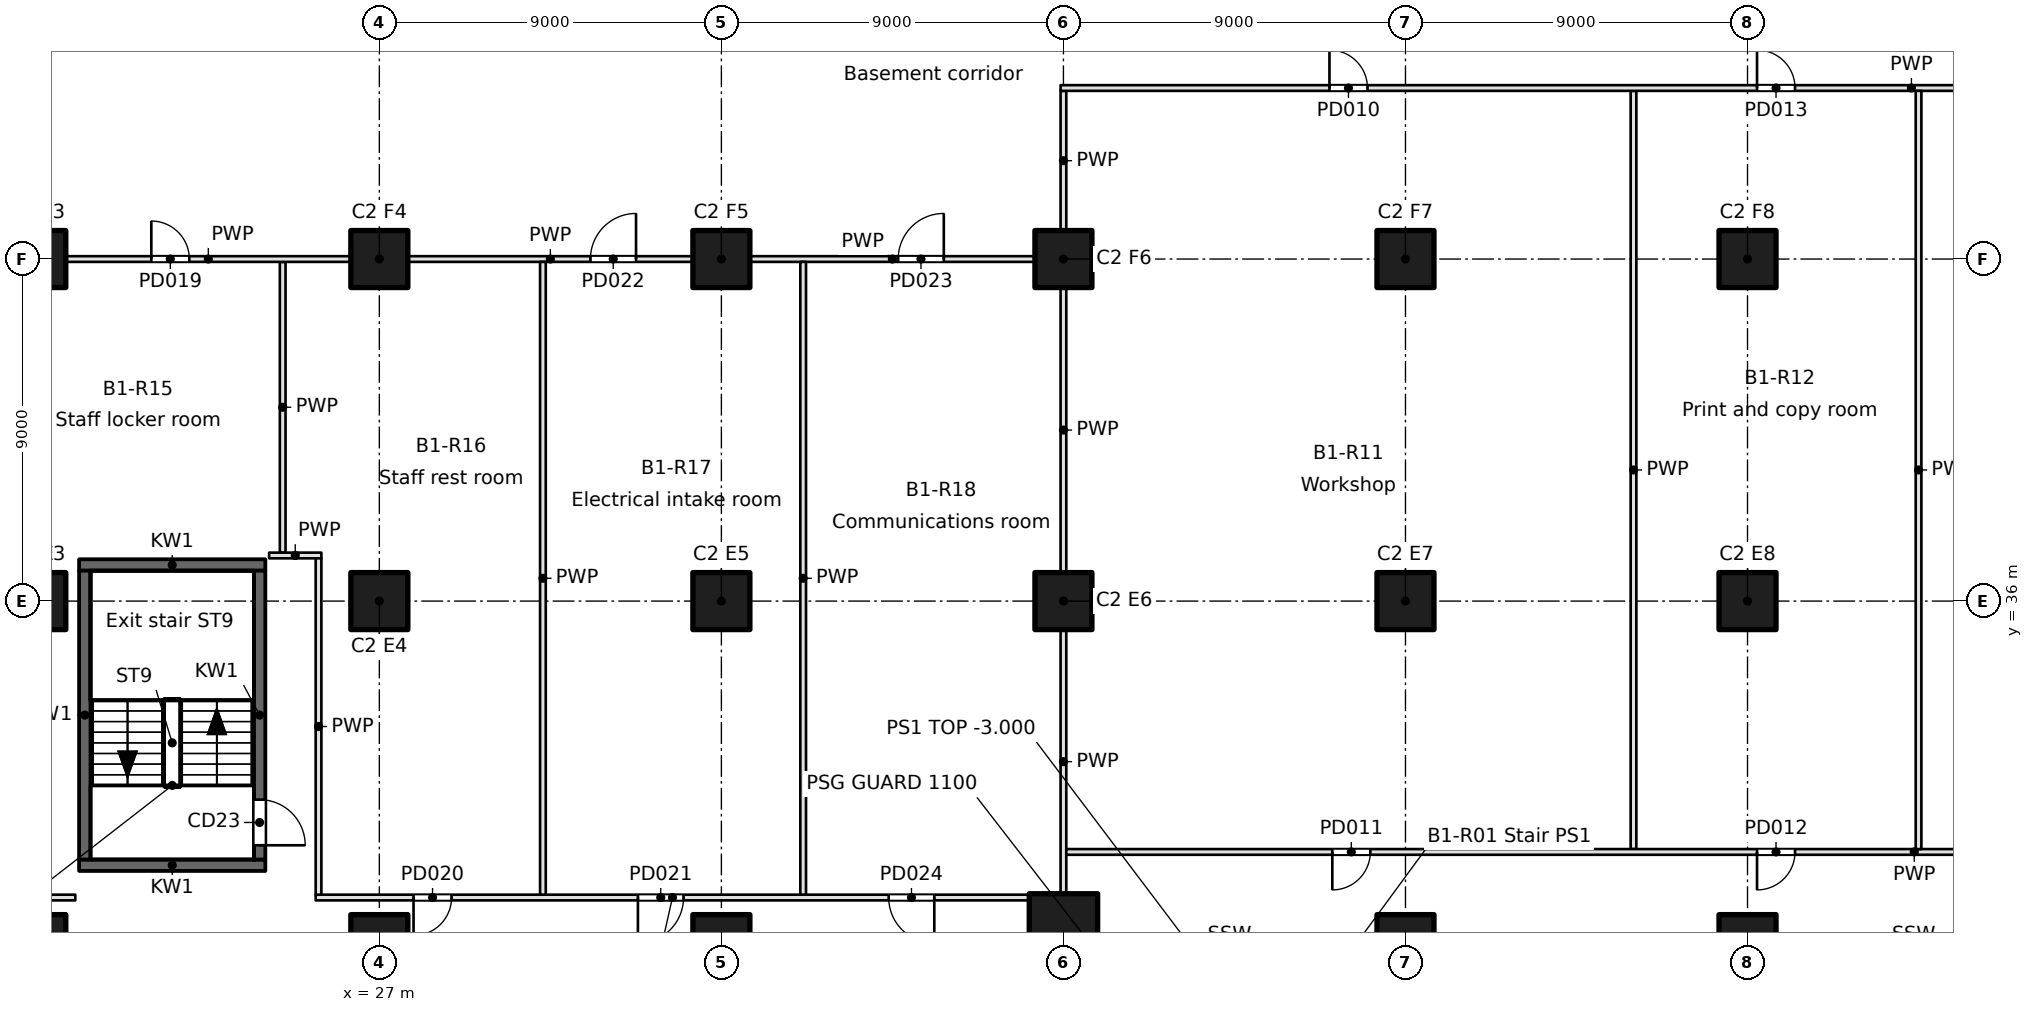
"""IFC4 building model, lengths in metres.
Left out: names, types, materials, properties, quantities, classifications, styles, units other than length and angle.
Written with IfcOpenShell. Run it as: python <this file> out.ifc"""

import sys

from ifc_helpers import new_model, si_unit, direction, frame, frame_2d, origin, origin_2d, place, context, subcontext, project, spatial, rectangle, extrude, element, fill, save


model = new_model("IFC4")
c1 = context("Model", 3, precision=1e-05, world=origin(), true_north=direction((0.0, 1.0)))
c2 = subcontext(c1, "Body", "Model", "MODEL_VIEW")
j1 = project(units=[si_unit("LENGTHUNIT", "METRE"), si_unit("PLANEANGLEUNIT", "RADIAN")], contexts=[c1])
p1 = place(None, origin())
s1 = spatial("IfcSite", under=j1, at=p1, CompositionType="ELEMENT")
p2 = place(p1, origin())
s2 = spatial("IfcBuilding", under=s1, at=p2, CompositionType="ELEMENT")
p3 = place(p2, frame((0.0, 0.0, -6.0)))
s3 = spatial("IfcBuildingStorey", under=s2, at=p3, CompositionType="ELEMENT", Elevation=-6.0)
p4 = place(p3, frame((45.0, 27.0, -0.6), z_axis=(0.0, 0.0, 1.0), x_axis=(0.0, 1.0, 0.0)))
e1 = element("IfcColumn", 1, at=p4, inside=s3, PredefinedType="COLUMN", context=c2, shape_type="SweptSolid", body=[
    extrude(rectangle(XDim=2.6, YDim=1.8, at=origin_2d()), origin(), (0.0, 0.0, 1.0), 6.6),
])
for number, where, z_axis, x_axis in (
    (2, (45.0, 36.0, -0.6), (0.0, 0.0, 1.0), (1.0, 0.0, 0.0)),
    (3, (45.0, 45.0, -0.6), (0.0, 0.0, 1.0), (1.0, 0.0, 0.0)),
    (4, (18.0, 27.0, -0.6), (0.0, 0.0, 1.0), (1.0, 0.0, 0.0)),
    (5, (18.0, 36.0, -0.6), (0.0, 0.0, 1.0), (1.0, 0.0, 0.0)),
    (6, (18.0, 45.0, -0.6), (0.0, 0.0, 1.0), (1.0, 0.0, 0.0)),
    (7, (27.0, 27.0, -0.6), (0.0, 0.0, 1.0), (1.0, 0.0, 0.0)),
    (8, (27.0, 36.0, -0.6), (0.0, 0.0, 1.0), (1.0, 0.0, 0.0)),
    (9, (27.0, 45.0, -0.6), (0.0, 0.0, 1.0), (1.0, 0.0, 0.0)),
    (10, (36.0, 27.0, -0.6), (0.0, 0.0, 1.0), (1.0, 0.0, 0.0)),
    (11, (36.0, 36.0, -0.6), (0.0, 0.0, 1.0), (1.0, 0.0, 0.0)),
    (12, (36.0, 45.0, -0.6), (0.0, 0.0, 1.0), (1.0, 0.0, 0.0)),
    (13, (54.0, 27.0, -0.6), (0.0, 0.0, 1.0), (1.0, 0.0, 0.0)),
    (14, (54.0, 36.0, -0.6), (0.0, 0.0, 1.0), (1.0, 0.0, 0.0)),
    (15, (54.0, 45.0, -0.6), (0.0, 0.0, 1.0), (1.0, 0.0, 0.0)),
    (16, (63.0, 27.0, -0.6), (0.0, 0.0, 1.0), (1.0, 0.0, 0.0)),
    (17, (63.0, 36.0, -0.6), (0.0, 0.0, 1.0), (1.0, 0.0, 0.0)),
    (18, (63.0, 45.0, -0.6), (0.0, 0.0, 1.0), (1.0, 0.0, 0.0)),
):
    element("IfcColumn", number, at=place(p3, frame(where, z_axis=z_axis, x_axis=x_axis)), inside=s3, PredefinedType="COLUMN", context=c2, shape_type="SweptSolid", body=[
        extrude(rectangle(XDim=1.5, YDim=1.5, at=origin_2d()), origin(), (0.0, 0.0, 1.0), 6.6),
    ])
for number, where, z_axis, x_axis in (
    (19, (19.1, 29.05, 0.0), (0.0, 0.0, 1.0), (1.0, 0.0, 0.0)),
    (20, (19.1, 36.95, 0.0), (0.0, 0.0, 1.0), (1.0, 0.0, 0.0)),
):
    element("IfcWall", number, at=place(p3, frame(where, z_axis=z_axis, x_axis=x_axis)), inside=s3, PredefinedType="SOLIDWALL", context=c2, shape_type="SweptSolid", body=[
        extrude(rectangle(XDim=4.9, YDim=0.3, at=frame_2d((2.45, 0.0))), origin(), (0.0, 0.0, 1.0), 5.6),
    ])
p5 = place(p3, frame((19.25, 29.2, 0.0), z_axis=(0.0, 0.0, 1.0), x_axis=(0.0, 1.0, 0.0)))
e21 = element("IfcWall", 21, at=p5, inside=s3, PredefinedType="SOLIDWALL", context=c2, shape_type="SweptSolid", body=[
    extrude(rectangle(XDim=7.6, YDim=0.3, at=frame_2d((3.8, 0.0))), origin(), (0.0, 0.0, 1.0), 5.6),
])
p6 = place(p3, frame((23.85, 29.2, 0.0), z_axis=(0.0, 0.0, 1.0), x_axis=(0.0, 1.0, 0.0)))
e22 = element("IfcWall", 22, at=p6, inside=s3, PredefinedType="SOLIDWALL", context=c2, shape_type="SweptSolid", body=[
    extrude(rectangle(XDim=7.6, YDim=0.3, at=frame_2d((3.8, 0.0))), origin(), (0.0, 0.0, 1.0), 5.6),
])
p7 = place(p6, frame((0.375, 0.0, 0.0)))
e23 = element("IfcOpeningElement", 23, at=p7, cuts=e22, PredefinedType="OPENING", context=c2, shape_type="SweptSolid", body=[
    extrude(rectangle(XDim=1.2, YDim=2.1, at=frame_2d((0.6, 1.05))), frame((0.0, 0.15, 0.0), z_axis=(0.0, -1.0, 0.0), x_axis=(1.0, 0.0, 0.0)), (0.0, 0.0, 1.0), 0.3),
])
p8 = place(p3, frame((45.0, 28.3, 0.0), z_axis=(0.0, 0.0, 1.0), x_axis=(0.0, 1.0, 0.0)))
e24 = element("IfcWall", 24, at=p8, inside=s3, PredefinedType="PARTITIONING", context=c2, shape_type="SweptSolid", body=[
    extrude(rectangle(XDim=6.95, YDim=0.15, at=frame_2d((3.475, 0.0))), origin(), (0.0, 0.0, 1.0), 5.6),
])
p9 = place(p3, frame((45.0, 36.75, 0.0), z_axis=(0.0, 0.0, 1.0), x_axis=(0.0, 1.0, 0.0)))
e25 = element("IfcWall", 25, at=p9, inside=s3, PredefinedType="PARTITIONING", context=c2, shape_type="SweptSolid", body=[
    extrude(rectangle(XDim=7.5, YDim=0.15, at=frame_2d((3.75, 0.0))), origin(), (0.0, 0.0, 1.0), 5.6),
])
p10 = place(p3, frame((45.0, 45.75, 0.0), z_axis=(0.0, 0.0, 1.0), x_axis=(0.0, 1.0, 0.0)))
e26 = element("IfcWall", 26, at=p10, inside=s3, PredefinedType="PARTITIONING", context=c2, shape_type="SweptSolid", body=[
    extrude(rectangle(XDim=3.675, YDim=0.15, at=frame_2d((1.837, 0.0))), origin(), (0.0, 0.0, 1.0), 5.6),
])
p11 = place(p3, frame((60.0, 29.475, 0.0), z_axis=(0.0, 0.0, 1.0), x_axis=(0.0, 1.0, 0.0)))
e27 = element("IfcWall", 27, at=p11, inside=s3, PredefinedType="PARTITIONING", context=c2, shape_type="SweptSolid", body=[
    extrude(rectangle(XDim=19.95, YDim=0.15, at=frame_2d((9.975, 0.0))), origin(), (0.0, 0.0, 1.0), 5.6),
])
p12 = place(p3, frame((89.7, 29.4, 0.0), z_axis=(0.0, 0.0, 1.0), x_axis=(-1.0, 0.0, 0.0)))
e28 = element("IfcWall", 28, at=p12, inside=s3, PredefinedType="PARTITIONING", context=c2, shape_type="SweptSolid", body=[
    extrude(rectangle(XDim=44.625, YDim=0.15, at=frame_2d((22.312, 0.0))), origin(), (0.0, 0.0, 1.0), 5.6),
])
p13 = place(p12, frame((36.625, 0.0, 0.0)))
e29 = element("IfcOpeningElement", 29, at=p13, cuts=e28, PredefinedType="OPENING", context=c2, shape_type="SweptSolid", body=[
    extrude(rectangle(XDim=1.0, YDim=2.1, at=frame_2d((0.5, 1.05))), frame((0.0, 0.075, 0.0), z_axis=(0.0, -1.0, 0.0), x_axis=(1.0, 0.0, 0.0)), (0.0, 0.0, 1.0), 0.15),
])
p14 = place(p12, frame((25.45, 0.0, 0.0)))
e30 = element("IfcOpeningElement", 30, at=p14, cuts=e28, PredefinedType="OPENING", context=c2, shape_type="SweptSolid", body=[
    extrude(rectangle(XDim=1.0, YDim=2.1, at=frame_2d((0.5, 1.05))), frame((0.0, 0.075, 0.0), z_axis=(0.0, -1.0, 0.0), x_axis=(1.0, 0.0, 0.0)), (0.0, 0.0, 1.0), 0.15),
])
p15 = place(p12, frame((14.0, 0.0, 0.0)))
e31 = element("IfcOpeningElement", 31, at=p15, cuts=e28, PredefinedType="OPENING", context=c2, shape_type="SweptSolid", body=[
    extrude(rectangle(XDim=1.2, YDim=2.1, at=frame_2d((0.6, 1.05))), frame((0.0, 0.075, 0.0), z_axis=(0.0, -1.0, 0.0), x_axis=(1.0, 0.0, 0.0)), (0.0, 0.0, 1.0), 0.15),
])
p16 = place(p12, frame((3.2, 0.0, 0.0)))
e32 = element("IfcOpeningElement", 32, at=p16, cuts=e28, PredefinedType="OPENING", context=c2, shape_type="SweptSolid", body=[
    extrude(rectangle(XDim=1.0, YDim=2.1, at=frame_2d((0.5, 1.05))), frame((0.0, 0.075, 0.0), z_axis=(0.0, -1.0, 0.0), x_axis=(1.0, 0.0, 0.0)), (0.0, 0.0, 1.0), 0.15),
])
p17 = place(p3, frame((44.925, 49.5, 0.0), z_axis=(0.0, 0.0, 1.0), x_axis=(1.0, 0.0, 0.0)))
e33 = element("IfcWall", 33, at=p17, inside=s3, PredefinedType="PARTITIONING", context=c2, shape_type="SweptSolid", body=[
    extrude(rectangle(XDim=44.775, YDim=0.15, at=frame_2d((22.387, 0.0))), origin(), (0.0, 0.0, 1.0), 5.6),
])
p18 = place(p17, frame((7.075, 0.0, 0.0)))
e34 = element("IfcOpeningElement", 34, at=p18, cuts=e33, PredefinedType="OPENING", context=c2, shape_type="SweptSolid", body=[
    extrude(rectangle(XDim=1.0, YDim=2.1, at=frame_2d((0.5, 1.05))), frame((0.0, 0.075, 0.0), z_axis=(0.0, -1.0, 0.0), x_axis=(1.0, 0.0, 0.0)), (0.0, 0.0, 1.0), 0.15),
])
p19 = place(p17, frame((18.325, 0.0, 0.0)))
e35 = element("IfcOpeningElement", 35, at=p19, cuts=e33, PredefinedType="OPENING", context=c2, shape_type="SweptSolid", body=[
    extrude(rectangle(XDim=1.0, YDim=2.1, at=frame_2d((0.5, 1.05))), frame((0.0, 0.075, 0.0), z_axis=(0.0, -1.0, 0.0), x_axis=(1.0, 0.0, 0.0)), (0.0, 0.0, 1.0), 0.15),
])
p20 = place(p17, frame((29.575, 0.0, 0.0)))
e36 = element("IfcOpeningElement", 36, at=p20, cuts=e33, PredefinedType="OPENING", context=c2, shape_type="SweptSolid", body=[
    extrude(rectangle(XDim=1.2, YDim=2.1, at=frame_2d((0.6, 1.05))), frame((0.0, 0.075, 0.0), z_axis=(0.0, -1.0, 0.0), x_axis=(1.0, 0.0, 0.0)), (0.0, 0.0, 1.0), 0.15),
])
p21 = place(p17, frame((40.575, 0.0, 0.0)))
e37 = element("IfcOpeningElement", 37, at=p21, cuts=e33, PredefinedType="OPENING", context=c2, shape_type="SweptSolid", body=[
    extrude(rectangle(XDim=1.0, YDim=2.1, at=frame_2d((0.5, 1.05))), frame((0.0, 0.075, 0.0), z_axis=(0.0, -1.0, 0.0), x_axis=(1.0, 0.0, 0.0)), (0.0, 0.0, 1.0), 0.15),
])
p22 = place(p3, frame((67.5, 29.475, 0.0), z_axis=(0.0, 0.0, 1.0), x_axis=(0.0, 1.0, 0.0)))
e38 = element("IfcWall", 38, at=p22, inside=s3, PredefinedType="PARTITIONING", context=c2, shape_type="SweptSolid", body=[
    extrude(rectangle(XDim=19.95, YDim=0.15, at=frame_2d((9.975, 0.0))), origin(), (0.0, 0.0, 1.0), 5.6),
])
p23 = place(p3, frame((24.457, 37.275, 0.0), z_axis=(0.0, 0.0, 1.0), x_axis=(0.0, 1.0, 0.0)))
e39 = element("IfcWall", 39, at=p23, inside=s3, PredefinedType="PARTITIONING", context=c2, shape_type="SweptSolid", body=[
    extrude(rectangle(XDim=7.65, YDim=0.15, at=frame_2d((3.825, 0.0))), origin(), (0.0, 0.0, 1.0), 5.6),
])
p24 = place(p3, frame((25.475, 37.2, 0.0), z_axis=(0.0, 0.0, 1.0), x_axis=(-1.0, 0.0, 0.0)))
e40 = element("IfcWall", 40, at=p24, inside=s3, PredefinedType="PARTITIONING", context=c2, shape_type="SweptSolid", body=[
    extrude(rectangle(XDim=1.375, YDim=0.15, at=frame_2d((0.688, 0.0))), origin(), (0.0, 0.0, 1.0), 5.6),
])
p25 = place(p3, frame((19.0, 28.2, 0.0), z_axis=(0.0, 0.0, 1.0), x_axis=(-1.0, 0.0, 0.0)))
e41 = element("IfcWall", 41, at=p25, inside=s3, PredefinedType="PARTITIONING", context=c2, shape_type="SweptSolid", body=[
    extrude(rectangle(XDim=5.575, YDim=0.15, at=frame_2d((2.788, 0.0))), origin(), (0.0, 0.0, 1.0), 5.6),
])
p26 = place(p3, frame((44.1, 28.2, 0.0), z_axis=(0.0, 0.0, 1.0), x_axis=(-1.0, 0.0, 0.0)))
e42 = element("IfcWall", 42, at=p26, inside=s3, PredefinedType="PARTITIONING", context=c2, shape_type="SweptSolid", body=[
    extrude(rectangle(XDim=18.775, YDim=0.15, at=frame_2d((9.388, 0.0))), origin(), (0.0, 0.0, 1.0), 5.6),
])
p27 = place(p26, frame((15.2, 0.0, 0.0)))
e43 = element("IfcOpeningElement", 43, at=p27, cuts=e42, PredefinedType="OPENING", context=c2, shape_type="SweptSolid", body=[
    extrude(rectangle(XDim=1.0, YDim=2.1, at=frame_2d((0.5, 1.05))), frame((0.0, 0.075, 0.0), z_axis=(0.0, -1.0, 0.0), x_axis=(1.0, 0.0, 0.0)), (0.0, 0.0, 1.0), 0.15),
])
p28 = place(p26, frame((9.096, 0.0, 0.0)))
e44 = element("IfcOpeningElement", 44, at=p28, cuts=e42, PredefinedType="OPENING", context=c2, shape_type="SweptSolid", body=[
    extrude(rectangle(XDim=1.2, YDim=2.1, at=frame_2d((0.6, 1.05))), frame((0.0, 0.075, 0.0), z_axis=(0.0, -1.0, 0.0), x_axis=(1.0, 0.0, 0.0)), (0.0, 0.0, 1.0), 0.15),
])
p29 = place(p26, frame((2.498, 0.0, 0.0)))
e45 = element("IfcOpeningElement", 45, at=p29, cuts=e42, PredefinedType="OPENING", context=c2, shape_type="SweptSolid", body=[
    extrude(rectangle(XDim=1.2, YDim=2.1, at=frame_2d((0.6, 1.05))), frame((0.0, 0.075, 0.0), z_axis=(0.0, -1.0, 0.0), x_axis=(1.0, 0.0, 0.0)), (0.0, 0.0, 1.0), 0.15),
])
p30 = place(p3, frame((18.75, 45.0, 0.0), z_axis=(0.0, 0.0, 1.0), x_axis=(1.0, 0.0, 0.0)))
e46 = element("IfcWall", 46, at=p30, inside=s3, PredefinedType="PARTITIONING", context=c2, shape_type="SweptSolid", body=[
    extrude(rectangle(XDim=7.5, YDim=0.15, at=frame_2d((3.75, 0.0))), origin(), (0.0, 0.0, 1.0), 5.6),
])
p31 = place(p30, frame((2.25, 0.0, 0.0)))
e47 = element("IfcOpeningElement", 47, at=p31, cuts=e46, PredefinedType="OPENING", context=c2, shape_type="SweptSolid", body=[
    extrude(rectangle(XDim=1.0, YDim=2.1, at=frame_2d((0.5, 1.05))), frame((0.0, 0.075, 0.0), z_axis=(0.0, -1.0, 0.0), x_axis=(1.0, 0.0, 0.0)), (0.0, 0.0, 1.0), 0.15),
])
p32 = place(p3, frame((27.75, 45.0, 0.0), z_axis=(0.0, 0.0, 1.0), x_axis=(1.0, 0.0, 0.0)))
e48 = element("IfcWall", 48, at=p32, inside=s3, PredefinedType="PARTITIONING", context=c2, shape_type="SweptSolid", body=[
    extrude(rectangle(XDim=7.5, YDim=0.15, at=frame_2d((3.75, 0.0))), origin(), (0.0, 0.0, 1.0), 5.6),
])
p33 = place(p32, frame((4.804, 0.0, 0.0)))
e49 = element("IfcOpeningElement", 49, at=p33, cuts=e48, PredefinedType="OPENING", context=c2, shape_type="SweptSolid", body=[
    extrude(rectangle(XDim=1.2, YDim=2.1, at=frame_2d((0.6, 1.05))), frame((0.0, 0.075, 0.0), z_axis=(0.0, -1.0, 0.0), x_axis=(1.0, 0.0, 0.0)), (0.0, 0.0, 1.0), 0.15),
])
p34 = place(p3, frame((36.75, 45.0, 0.0), z_axis=(0.0, 0.0, 1.0), x_axis=(1.0, 0.0, 0.0)))
e50 = element("IfcWall", 50, at=p34, inside=s3, PredefinedType="PARTITIONING", context=c2, shape_type="SweptSolid", body=[
    extrude(rectangle(XDim=7.5, YDim=0.15, at=frame_2d((3.75, 0.0))), origin(), (0.0, 0.0, 1.0), 5.6),
])
p35 = place(p34, frame((3.902, 0.0, 0.0)))
e51 = element("IfcOpeningElement", 51, at=p35, cuts=e50, PredefinedType="OPENING", context=c2, shape_type="SweptSolid", body=[
    extrude(rectangle(XDim=1.2, YDim=2.1, at=frame_2d((0.6, 1.05))), frame((0.0, 0.075, 0.0), z_axis=(0.0, -1.0, 0.0), x_axis=(1.0, 0.0, 0.0)), (0.0, 0.0, 1.0), 0.15),
])
p36 = place(p3, frame((31.304, 28.275, 0.0), z_axis=(0.0, 0.0, 1.0), x_axis=(0.0, 1.0, 0.0)))
e52 = element("IfcWall", 52, at=p36, inside=s3, PredefinedType="PARTITIONING", context=c2, shape_type="SweptSolid", body=[
    extrude(rectangle(XDim=16.65, YDim=0.15, at=frame_2d((8.325, 0.0))), origin(), (0.0, 0.0, 1.0), 5.6),
])
p37 = place(p3, frame((25.4, 28.275, 0.0), z_axis=(0.0, 0.0, 1.0), x_axis=(0.0, 1.0, 0.0)))
e53 = element("IfcWall", 53, at=p37, inside=s3, PredefinedType="PARTITIONING", context=c2, shape_type="SweptSolid", body=[
    extrude(rectangle(XDim=8.85, YDim=0.15, at=frame_2d((4.425, 0.0))), origin(), (0.0, 0.0, 1.0), 5.6),
])
p38 = place(p3, frame((38.152, 28.275, 0.0), z_axis=(0.0, 0.0, 1.0), x_axis=(0.0, 1.0, 0.0)))
e54 = element("IfcWall", 54, at=p38, inside=s3, PredefinedType="PARTITIONING", context=c2, shape_type="SweptSolid", body=[
    extrude(rectangle(XDim=16.65, YDim=0.15, at=frame_2d((8.325, 0.0))), origin(), (0.0, 0.0, 1.0), 5.6),
])
p39 = place(p7, frame((1.2, 0.0, 0.0), z_axis=(0.0, 0.0, 1.0), x_axis=(-1.0, 0.0, 0.0)))
e55 = element("IfcDoor", 55, at=p39, inside=s3, OperationType="SINGLE_SWING_RIGHT", PredefinedType="DOOR", context=c2, shape_type="SweptSolid", body=[
    extrude(rectangle(XDim=1.2, YDim=2.1, at=frame_2d((0.6, 1.05))), frame((0.0, 0.025, 0.0), z_axis=(0.0, -1.0, 0.0), x_axis=(1.0, 0.0, 0.0)), (0.0, 0.0, 1.0), 0.05),
])
fill(e23, e55)
p40 = place(p18, origin())
e56 = element("IfcDoor", 56, at=p40, inside=s3, OperationType="SINGLE_SWING_LEFT", PredefinedType="DOOR", context=c2, shape_type="SweptSolid", body=[
    extrude(rectangle(XDim=1.0, YDim=2.1, at=frame_2d((0.5, 1.05))), frame((0.0, 0.025, 0.0), z_axis=(0.0, -1.0, 0.0), x_axis=(1.0, 0.0, 0.0)), (0.0, 0.0, 1.0), 0.05),
])
fill(e34, e56)
p41 = place(p13, origin())
e57 = element("IfcDoor", 57, at=p41, inside=s3, OperationType="SINGLE_SWING_RIGHT", PredefinedType="DOOR", context=c2, shape_type="SweptSolid", body=[
    extrude(rectangle(XDim=1.0, YDim=2.1, at=frame_2d((0.5, 1.05))), frame((0.0, 0.025, 0.0), z_axis=(0.0, -1.0, 0.0), x_axis=(1.0, 0.0, 0.0)), (0.0, 0.0, 1.0), 0.05),
])
fill(e29, e57)
p42 = place(p14, origin())
e58 = element("IfcDoor", 58, at=p42, inside=s3, OperationType="SINGLE_SWING_RIGHT", PredefinedType="DOOR", context=c2, shape_type="SweptSolid", body=[
    extrude(rectangle(XDim=1.0, YDim=2.1, at=frame_2d((0.5, 1.05))), frame((0.0, 0.025, 0.0), z_axis=(0.0, -1.0, 0.0), x_axis=(1.0, 0.0, 0.0)), (0.0, 0.0, 1.0), 0.05),
])
fill(e30, e58)
p43 = place(p19, origin())
e59 = element("IfcDoor", 59, at=p43, inside=s3, OperationType="SINGLE_SWING_LEFT", PredefinedType="DOOR", context=c2, shape_type="SweptSolid", body=[
    extrude(rectangle(XDim=1.0, YDim=2.1, at=frame_2d((0.5, 1.05))), frame((0.0, 0.025, 0.0), z_axis=(0.0, -1.0, 0.0), x_axis=(1.0, 0.0, 0.0)), (0.0, 0.0, 1.0), 0.05),
])
fill(e35, e59)
p44 = place(p31, origin())
e60 = element("IfcDoor", 60, at=p44, inside=s3, OperationType="SINGLE_SWING_LEFT", PredefinedType="DOOR", context=c2, shape_type="SweptSolid", body=[
    extrude(rectangle(XDim=1.0, YDim=2.1, at=frame_2d((0.5, 1.05))), frame((0.0, 0.025, 0.0), z_axis=(0.0, -1.0, 0.0), x_axis=(1.0, 0.0, 0.0)), (0.0, 0.0, 1.0), 0.05),
])
fill(e47, e60)
p45 = place(p27, origin())
e61 = element("IfcDoor", 61, at=p45, inside=s3, OperationType="SINGLE_SWING_RIGHT", PredefinedType="DOOR", context=c2, shape_type="SweptSolid", body=[
    extrude(rectangle(XDim=1.0, YDim=2.1, at=frame_2d((0.5, 1.05))), frame((0.0, 0.025, 0.0), z_axis=(0.0, -1.0, 0.0), x_axis=(1.0, 0.0, 0.0)), (0.0, 0.0, 1.0), 0.05),
])
fill(e43, e61)
p46 = place(p28, origin())
e62 = element("IfcDoor", 62, at=p46, inside=s3, OperationType="SINGLE_SWING_RIGHT", PredefinedType="DOOR", context=c2, shape_type="SweptSolid", body=[
    extrude(rectangle(XDim=1.2, YDim=2.1, at=frame_2d((0.6, 1.05))), frame((0.0, 0.025, 0.0), z_axis=(0.0, -1.0, 0.0), x_axis=(1.0, 0.0, 0.0)), (0.0, 0.0, 1.0), 0.05),
])
fill(e44, e62)
p47 = place(p33, origin())
e63 = element("IfcDoor", 63, at=p47, inside=s3, OperationType="SINGLE_SWING_RIGHT", PredefinedType="DOOR", context=c2, shape_type="SweptSolid", body=[
    extrude(rectangle(XDim=1.2, YDim=2.1, at=frame_2d((0.6, 1.05))), frame((0.0, 0.025, 0.0), z_axis=(0.0, -1.0, 0.0), x_axis=(1.0, 0.0, 0.0)), (0.0, 0.0, 1.0), 0.05),
])
fill(e49, e63)
p48 = place(p35, origin())
e64 = element("IfcDoor", 64, at=p48, inside=s3, OperationType="SINGLE_SWING_RIGHT", PredefinedType="DOOR", context=c2, shape_type="SweptSolid", body=[
    extrude(rectangle(XDim=1.2, YDim=2.1, at=frame_2d((0.6, 1.05))), frame((0.0, 0.025, 0.0), z_axis=(0.0, -1.0, 0.0), x_axis=(1.0, 0.0, 0.0)), (0.0, 0.0, 1.0), 0.05),
])
fill(e51, e64)
p49 = place(p29, origin())
e65 = element("IfcDoor", 65, at=p49, inside=s3, OperationType="SINGLE_SWING_LEFT", PredefinedType="DOOR", context=c2, shape_type="SweptSolid", body=[
    extrude(rectangle(XDim=1.2, YDim=2.1, at=frame_2d((0.6, 1.05))), frame((0.0, 0.025, 0.0), z_axis=(0.0, -1.0, 0.0), x_axis=(1.0, 0.0, 0.0)), (0.0, 0.0, 1.0), 0.05),
])
fill(e45, e65)
save(model, sys.argv[1])
